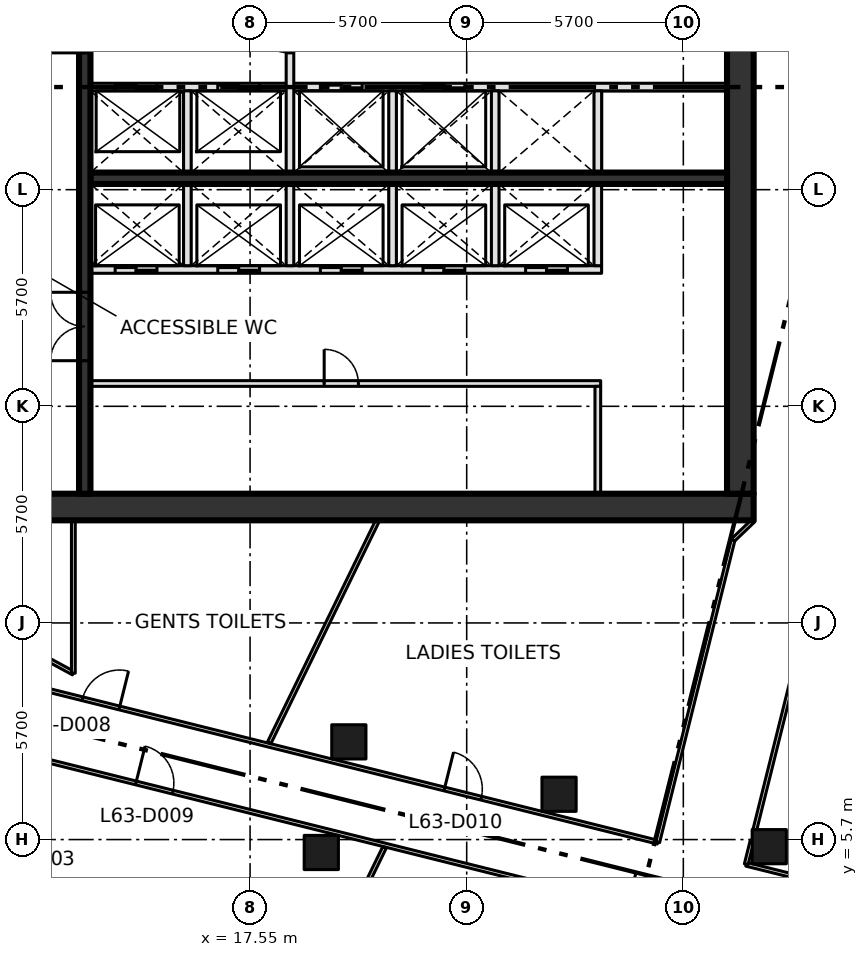
"""IFC4 building model, lengths in metres.
Left out: names, types, materials, properties, quantities, classifications, styles, units other than length and angle.
Written with IfcOpenShell. Run it as: python <this file> out.ifc"""

import sys

from ifc_helpers import new_model, si_unit, direction, frame, frame_2d, origin, origin_2d, place, context, subcontext, project, spatial, rectangle, extrude, element, fill, save


model = new_model("IFC4")
c1 = context("Model", 3, precision=1e-05, world=origin(), true_north=direction((0.0, 1.0)))
c2 = subcontext(c1, "Body", "Model", "MODEL_VIEW")
j1 = project(units=[si_unit("LENGTHUNIT", "METRE"), si_unit("PLANEANGLEUNIT", "RADIAN")], contexts=[c1])
p1 = place(None, origin())
s1 = spatial("IfcSite", under=j1, at=p1, CompositionType="ELEMENT")
p2 = place(p1, origin())
s2 = spatial("IfcBuilding", under=s1, at=p2, CompositionType="ELEMENT")
p3 = place(p2, frame((0.0, 0.0, 276.0)))
s3 = spatial("IfcBuildingStorey", under=s2, at=p3, CompositionType="ELEMENT", Elevation=276.0)
for number, where, z_axis, x_axis in (
    (1, (19.424, 5.36, 0.0), (0.0, 0.0, 1.0), (1.0, 0.0, 0.0)),
    (2, (20.149, 8.271, 0.0), (0.0, 0.0, 1.0), (1.0, 0.0, 0.0)),
    (3, (25.68, 6.892, 0.0), (0.0, 0.0, 1.0), (1.0, 0.0, 0.0)),
    (4, (31.211, 5.513, 0.0), (0.0, 0.0, 1.0), (1.0, 0.0, 0.0)),
):
    element("IfcColumn", number, at=place(p3, frame(where, z_axis=z_axis, x_axis=x_axis)), inside=s3, PredefinedType="COLUMN", context=c2, shape_type="SweptSolid", body=[
        extrude(rectangle(XDim=0.9, YDim=0.9, at=origin_2d()), origin(), (0.0, 0.0, 1.0), 4.2),
    ])
p4 = place(p3, frame((8.0, 14.45, -0.3), z_axis=(0.0, 0.0, 1.0), x_axis=(1.0, 0.0, 0.0)))
e5 = element("IfcWall", 5, at=p4, inside=s3, PredefinedType="SHEAR", context=c2, shape_type="SweptSolid", body=[
    extrude(rectangle(XDim=22.8, YDim=0.7, at=frame_2d((11.4, 0.0))), origin(), (0.0, 0.0, 1.0), 4.2),
])
p5 = place(p4, frame((2.3, 0.0, 0.3)))
e6 = element("IfcOpeningElement", 6, at=p5, cuts=e5, PredefinedType="OPENING", context=c2, shape_type="SweptSolid", body=[
    extrude(rectangle(XDim=1.8, YDim=2.1, at=frame_2d((0.9, 1.05))), frame((0.0, 0.36, 0.0), z_axis=(0.0, -1.0, 0.0), x_axis=(1.0, 0.0, 0.0)), (0.0, 0.0, 1.0), 0.72),
])
p6 = place(p3, frame((30.45, 14.8, -0.3), z_axis=(0.0, 0.0, 1.0), x_axis=(0.0, 1.0, 0.0)))
e7 = element("IfcWall", 7, at=p6, inside=s3, PredefinedType="SHEAR", context=c2, shape_type="SweptSolid", body=[
    extrude(rectangle(XDim=20.9, YDim=0.7, at=frame_2d((10.45, 0.0))), origin(), (0.0, 0.0, 1.0), 4.2),
])
p7 = place(p3, frame((13.35, 17.7, 0.0), z_axis=(0.0, 0.0, 1.0), x_axis=(1.0, 0.0, 0.0)))
e8 = element("IfcWall", 8, at=p7, inside=s3, PredefinedType="PARTITIONING", context=c2, shape_type="SweptSolid", body=[
    extrude(rectangle(XDim=13.425, YDim=0.15, at=frame_2d((6.712, 0.0))), origin(), (0.0, 0.0, 1.0), 3.9),
])
p8 = place(p7, frame((6.15, 0.0, 0.0)))
e9 = element("IfcOpeningElement", 9, at=p8, cuts=e8, PredefinedType="OPENING", context=c2, shape_type="SweptSolid", body=[
    extrude(rectangle(XDim=0.9, YDim=2.1, at=frame_2d((0.45, 1.05))), frame((0.0, 0.085, 0.0), z_axis=(0.0, -1.0, 0.0), x_axis=(1.0, 0.0, 0.0)), (0.0, 0.0, 1.0), 0.17),
])
p9 = place(p3, frame((13.35, 20.7, 0.0), z_axis=(0.0, 0.0, 1.0), x_axis=(1.0, 0.0, 0.0)))
e10 = element("IfcWall", 10, at=p9, inside=s3, PredefinedType="SOLIDWALL", context=c2, shape_type="SweptSolid", body=[
    extrude(rectangle(XDim=13.45, YDim=0.2, at=frame_2d((6.725, 0.0))), origin(), (0.0, 0.0, 1.0), 3.9),
])
p10 = place(p9, frame((0.65, 0.0, 0.0)))
e11 = element("IfcOpeningElement", 11, at=p10, cuts=e10, PredefinedType="OPENING", context=c2, shape_type="SweptSolid", body=[
    extrude(rectangle(XDim=1.1, YDim=2.1, at=frame_2d((0.55, 1.05))), frame((0.0, 0.11, 0.0), z_axis=(0.0, -1.0, 0.0), x_axis=(1.0, 0.0, 0.0)), (0.0, 0.0, 1.0), 0.22),
])
p11 = place(p9, frame((3.35, 0.0, 0.0)))
e12 = element("IfcOpeningElement", 12, at=p11, cuts=e10, PredefinedType="OPENING", context=c2, shape_type="SweptSolid", body=[
    extrude(rectangle(XDim=1.1, YDim=2.1, at=frame_2d((0.55, 1.05))), frame((0.0, 0.11, 0.0), z_axis=(0.0, -1.0, 0.0), x_axis=(1.0, 0.0, 0.0)), (0.0, 0.0, 1.0), 0.22),
])
p12 = place(p9, frame((6.05, 0.0, 0.0)))
e13 = element("IfcOpeningElement", 13, at=p12, cuts=e10, PredefinedType="OPENING", context=c2, shape_type="SweptSolid", body=[
    extrude(rectangle(XDim=1.1, YDim=2.1, at=frame_2d((0.55, 1.05))), frame((0.0, 0.11, 0.0), z_axis=(0.0, -1.0, 0.0), x_axis=(1.0, 0.0, 0.0)), (0.0, 0.0, 1.0), 0.22),
])
p13 = place(p9, frame((8.75, 0.0, 0.0)))
e14 = element("IfcOpeningElement", 14, at=p13, cuts=e10, PredefinedType="OPENING", context=c2, shape_type="SweptSolid", body=[
    extrude(rectangle(XDim=1.1, YDim=2.1, at=frame_2d((0.55, 1.05))), frame((0.0, 0.11, 0.0), z_axis=(0.0, -1.0, 0.0), x_axis=(1.0, 0.0, 0.0)), (0.0, 0.0, 1.0), 0.22),
])
p14 = place(p9, frame((11.45, 0.0, 0.0)))
e15 = element("IfcOpeningElement", 15, at=p14, cuts=e10, PredefinedType="OPENING", context=c2, shape_type="SweptSolid", body=[
    extrude(rectangle(XDim=1.1, YDim=2.1, at=frame_2d((0.55, 1.05))), frame((0.0, 0.11, 0.0), z_axis=(0.0, -1.0, 0.0), x_axis=(1.0, 0.0, 0.0)), (0.0, 0.0, 1.0), 0.22),
])
p15 = place(p3, frame((13.35, 23.1, 0.0), z_axis=(0.0, 0.0, 1.0), x_axis=(1.0, 0.0, 0.0)))
e16 = element("IfcWall", 16, at=p15, inside=s3, PredefinedType="SHEAR", context=c2, shape_type="SweptSolid", body=[
    extrude(rectangle(XDim=16.75, YDim=0.3, at=frame_2d((8.375, 0.0))), origin(), (0.0, 0.0, 1.0), 3.9),
])
p16 = place(p3, frame((13.35, 25.5, 0.0), z_axis=(0.0, 0.0, 1.0), x_axis=(1.0, 0.0, 0.0)))
e17 = element("IfcWall", 17, at=p16, inside=s3, PredefinedType="SOLIDWALL", context=c2, shape_type="SweptSolid", body=[
    extrude(rectangle(XDim=16.75, YDim=0.2, at=frame_2d((8.375, 0.0))), origin(), (0.0, 0.0, 1.0), 3.9),
])
p17 = place(p16, frame((0.65, 0.0, 0.0)))
e18 = element("IfcOpeningElement", 18, at=p17, cuts=e17, PredefinedType="OPENING", context=c2, shape_type="SweptSolid", body=[
    extrude(rectangle(XDim=1.1, YDim=2.1, at=frame_2d((0.55, 1.05))), frame((0.0, 0.11, 0.0), z_axis=(0.0, -1.0, 0.0), x_axis=(1.0, 0.0, 0.0)), (0.0, 0.0, 1.0), 0.22),
])
p18 = place(p16, frame((3.35, 0.0, 0.0)))
e19 = element("IfcOpeningElement", 19, at=p18, cuts=e17, PredefinedType="OPENING", context=c2, shape_type="SweptSolid", body=[
    extrude(rectangle(XDim=1.1, YDim=2.1, at=frame_2d((0.55, 1.05))), frame((0.0, 0.11, 0.0), z_axis=(0.0, -1.0, 0.0), x_axis=(1.0, 0.0, 0.0)), (0.0, 0.0, 1.0), 0.22),
])
p19 = place(p16, frame((6.05, 0.0, 0.0)))
e20 = element("IfcOpeningElement", 20, at=p19, cuts=e17, PredefinedType="OPENING", context=c2, shape_type="SweptSolid", body=[
    extrude(rectangle(XDim=1.1, YDim=2.1, at=frame_2d((0.55, 1.05))), frame((0.0, 0.11, 0.0), z_axis=(0.0, -1.0, 0.0), x_axis=(1.0, 0.0, 0.0)), (0.0, 0.0, 1.0), 0.22),
])
p20 = place(p16, frame((8.75, 0.0, 0.0)))
e21 = element("IfcOpeningElement", 21, at=p20, cuts=e17, PredefinedType="OPENING", context=c2, shape_type="SweptSolid", body=[
    extrude(rectangle(XDim=1.1, YDim=2.1, at=frame_2d((0.55, 1.05))), frame((0.0, 0.11, 0.0), z_axis=(0.0, -1.0, 0.0), x_axis=(1.0, 0.0, 0.0)), (0.0, 0.0, 1.0), 0.22),
])
p21 = place(p3, frame((13.2, 14.8, 0.0), z_axis=(0.0, 0.0, 1.0), x_axis=(0.0, 1.0, 0.0)))
e22 = element("IfcWall", 22, at=p21, inside=s3, PredefinedType="SHEAR", context=c2, shape_type="SweptSolid", body=[
    extrude(rectangle(XDim=20.9, YDim=0.3, at=frame_2d((10.45, 0.0))), origin(), (0.0, 0.0, 1.0), 3.9),
])
p22 = place(p21, frame((3.5, 0.0, 0.0)))
e23 = element("IfcOpeningElement", 23, at=p22, cuts=e22, PredefinedType="OPENING", context=c2, shape_type="SweptSolid", body=[
    extrude(rectangle(XDim=1.8, YDim=2.1, at=frame_2d((0.9, 1.05))), frame((0.0, 0.16, 0.0), z_axis=(0.0, -1.0, 0.0), x_axis=(1.0, 0.0, 0.0)), (0.0, 0.0, 1.0), 0.32),
])
p23 = place(p21, frame((11.6, 0.0, 0.0)))
e24 = element("IfcOpeningElement", 24, at=p23, cuts=e22, PredefinedType="OPENING", context=c2, shape_type="SweptSolid", body=[
    extrude(rectangle(XDim=1.2, YDim=2.1, at=frame_2d((0.6, 1.05))), frame((0.0, 0.16, 0.0), z_axis=(0.0, -1.0, 0.0), x_axis=(1.0, 0.0, 0.0)), (0.0, 0.0, 1.0), 0.32),
])
p24 = place(p3, frame((15.9, 20.8, 0.0), z_axis=(0.0, 0.0, 1.0), x_axis=(0.0, 1.0, 0.0)))
e25 = element("IfcWall", 25, at=p24, inside=s3, PredefinedType="SOLIDWALL", context=c2, shape_type="SweptSolid", body=[
    extrude(rectangle(XDim=4.6, YDim=0.2, at=frame_2d((2.3, 0.0))), origin(), (0.0, 0.0, 1.0), 3.9),
])
p25 = place(p3, frame((18.6, 20.8, 0.0), z_axis=(0.0, 0.0, 1.0), x_axis=(0.0, 1.0, 0.0)))
e26 = element("IfcWall", 26, at=p25, inside=s3, PredefinedType="SOLIDWALL", context=c2, shape_type="SweptSolid", body=[
    extrude(rectangle(XDim=7.6, YDim=0.2, at=frame_2d((3.8, 0.0))), origin(), (0.0, 0.0, 1.0), 3.9),
])
p26 = place(p25, frame((5.6, 0.0, 0.0)))
e27 = element("IfcOpeningElement", 27, at=p26, cuts=e26, PredefinedType="OPENING", context=c2, shape_type="SweptSolid", body=[
    extrude(rectangle(XDim=1.2, YDim=2.1, at=frame_2d((0.6, 1.05))), frame((0.0, 0.11, 0.0), z_axis=(0.0, -1.0, 0.0), x_axis=(1.0, 0.0, 0.0)), (0.0, 0.0, 1.0), 0.22),
])
for number, where, z_axis, x_axis in (
    (28, (21.3, 20.8, 0.0), (0.0, 0.0, 1.0), (0.0, 1.0, 0.0)),
    (29, (24.0, 20.8, 0.0), (0.0, 0.0, 1.0), (0.0, 1.0, 0.0)),
):
    element("IfcWall", number, at=place(p3, frame(where, z_axis=z_axis, x_axis=x_axis)), inside=s3, PredefinedType="SOLIDWALL", context=c2, shape_type="SweptSolid", body=[
        extrude(rectangle(XDim=4.6, YDim=0.2, at=frame_2d((2.3, 0.0))), origin(), (0.0, 0.0, 1.0), 3.9),
    ])
p27 = place(p3, frame((26.7, 14.8, 0.0), z_axis=(0.0, 0.0, 1.0), x_axis=(0.0, 1.0, 0.0)))
e30 = element("IfcWall", 30, at=p27, inside=s3, PredefinedType="PARTITIONING", context=c2, shape_type="SweptSolid", body=[
    extrude(rectangle(XDim=2.825, YDim=0.15, at=frame_2d((1.413, 0.0))), origin(), (0.0, 0.0, 1.0), 3.9),
])
p28 = place(p3, frame((26.7, 20.8, 0.0), z_axis=(0.0, 0.0, 1.0), x_axis=(0.0, 1.0, 0.0)))
e31 = element("IfcWall", 31, at=p28, inside=s3, PredefinedType="SOLIDWALL", context=c2, shape_type="SweptSolid", body=[
    extrude(rectangle(XDim=4.6, YDim=0.2, at=frame_2d((2.3, 0.0))), origin(), (0.0, 0.0, 1.0), 3.9),
])
p29 = place(p3, frame((10.263, 4.695, 0.0), z_axis=(0.0, 0.0, 1.0), x_axis=(0.615624224328, -0.788039855858, 0.0)))
e32 = element("IfcWall", 32, at=p29, inside=s3, PredefinedType="SOLIDWALL", context=c2, shape_type="SweptSolid", body=[
    extrude(rectangle(XDim=4.303, YDim=0.2, at=frame_2d((2.152, 0.0))), origin(), (0.0, 0.0, 1.0), 3.15),
])
p30 = place(p29, frame((1.251, 0.0, 0.0)))
e33 = element("IfcOpeningElement", 33, at=p30, cuts=e32, PredefinedType="OPENING", context=c2, shape_type="SweptSolid", body=[
    extrude(rectangle(XDim=1.8, YDim=2.9, at=frame_2d((0.9, 1.45))), frame((0.0, 0.11, 0.0), z_axis=(0.0, -1.0, 0.0), x_axis=(1.0, 0.0, 0.0)), (0.0, 0.0, 1.0), 0.22),
])
p31 = place(p3, frame((8.55, 8.685, 0.0), z_axis=(0.0, 0.0, 1.0), x_axis=(0.970297101369, -0.241916380335, 0.0)))
e34 = element("IfcWall", 34, at=p31, inside=s3, PredefinedType="PARTITIONING", context=c2, shape_type="SweptSolid", body=[
    extrude(rectangle(XDim=51.675, YDim=0.1, at=frame_2d((25.837, 0.0))), origin(), (0.0, 0.0, 1.0), 3.9),
])
p32 = place(p31, frame((35.018, 0.0, 0.0)))
e35 = element("IfcOpeningElement", 35, at=p32, cuts=e34, PredefinedType="OPENING", context=c2, shape_type="SweptSolid", body=[
    extrude(rectangle(XDim=1.8, YDim=2.1, at=frame_2d((0.9, 1.05))), frame((0.0, 0.06, 0.0), z_axis=(0.0, -1.0, 0.0), x_axis=(1.0, 0.0, 0.0)), (0.0, 0.0, 1.0), 0.12),
])
p33 = place(p31, frame((19.518, 0.0, 0.0)))
e36 = element("IfcOpeningElement", 36, at=p33, cuts=e34, PredefinedType="OPENING", context=c2, shape_type="SweptSolid", body=[
    extrude(rectangle(XDim=1.8, YDim=2.1, at=frame_2d((0.9, 1.05))), frame((0.0, 0.06, 0.0), z_axis=(0.0, -1.0, 0.0), x_axis=(1.0, 0.0, 0.0)), (0.0, 0.0, 1.0), 0.12),
])
p34 = place(p31, frame((25.118, 0.0, 0.0)))
e37 = element("IfcOpeningElement", 37, at=p34, cuts=e34, PredefinedType="OPENING", context=c2, shape_type="SweptSolid", body=[
    extrude(rectangle(XDim=1.0, YDim=2.1, at=frame_2d((0.5, 1.05))), frame((0.0, 0.06, 0.0), z_axis=(0.0, -1.0, 0.0), x_axis=(1.0, 0.0, 0.0)), (0.0, 0.0, 1.0), 0.12),
])
p35 = place(p31, frame((6.18, 0.0, 0.0)))
e38 = element("IfcOpeningElement", 38, at=p35, cuts=e34, PredefinedType="OPENING", context=c2, shape_type="SweptSolid", body=[
    extrude(rectangle(XDim=1.0, YDim=2.1, at=frame_2d((0.5, 1.05))), frame((0.0, 0.06, 0.0), z_axis=(0.0, -1.0, 0.0), x_axis=(1.0, 0.0, 0.0)), (0.0, 0.0, 1.0), 0.12),
])
p36 = place(p3, frame((8.988, 10.44, 0.0), z_axis=(0.0, 0.0, 1.0), x_axis=(0.970301223092, -0.241899848006, 0.0)))
e39 = element("IfcWall", 39, at=p36, inside=s3, PredefinedType="PARTITIONING", context=c2, shape_type="SweptSolid", body=[
    extrude(rectangle(XDim=19.879, YDim=0.1, at=frame_2d((9.94, 0.0))), origin(), (0.0, 0.0, 1.0), 3.9),
])
p37 = place(p36, frame((4.28, 0.0, 0.0)))
e40 = element("IfcOpeningElement", 40, at=p37, cuts=e39, PredefinedType="OPENING", context=c2, shape_type="SweptSolid", body=[
    extrude(rectangle(XDim=1.0, YDim=2.1, at=frame_2d((0.5, 1.05))), frame((0.0, 0.06, 0.0), z_axis=(0.0, -1.0, 0.0), x_axis=(1.0, 0.0, 0.0)), (0.0, 0.0, 1.0), 0.12),
])
p38 = place(p36, frame((14.093, 0.0, 0.0)))
e41 = element("IfcOpeningElement", 41, at=p38, cuts=e39, PredefinedType="OPENING", context=c2, shape_type="SweptSolid", body=[
    extrude(rectangle(XDim=1.0, YDim=2.1, at=frame_2d((0.5, 1.05))), frame((0.0, 0.06, 0.0), z_axis=(0.0, -1.0, 0.0), x_axis=(1.0, 0.0, 0.0)), (0.0, 0.0, 1.0), 0.12),
])
p39 = place(p3, frame((9.9, 11.7, 0.0), z_axis=(0.0, 0.0, 1.0), x_axis=(0.87965147249, -0.475618846291, 0.0)))
e42 = element("IfcWall", 42, at=p39, inside=s3, PredefinedType="PARTITIONING", context=c2, shape_type="SweptSolid", body=[
    extrude(rectangle(XDim=3.41, YDim=0.1, at=frame_2d((1.705, 0.0))), origin(), (0.0, 0.0, 1.0), 3.9),
])
p40 = place(p3, frame((12.9, 10.078, 0.0), z_axis=(0.0, 0.0, 1.0), x_axis=(0.0, 1.0, 0.0)))
e43 = element("IfcWall", 43, at=p40, inside=s3, PredefinedType="PARTITIONING", context=c2, shape_type="SweptSolid", body=[
    extrude(rectangle(XDim=4.022, YDim=0.1, at=frame_2d((2.011, 0.0))), origin(), (0.0, 0.0, 1.0), 3.9),
])
p41 = place(p3, frame((30.259, 13.583, 0.0), z_axis=(0.0, 0.0, 1.0), x_axis=(-0.241841612879, -0.970315739479, 0.0)))
e44 = element("IfcWall", 44, at=p41, inside=s3, PredefinedType="PARTITIONING", context=c2, shape_type="SweptSolid", body=[
    extrude(rectangle(XDim=8.195, YDim=0.1, at=frame_2d((4.098, 0.0))), origin(), (0.0, 0.0, 1.0), 3.9),
])
p42 = place(p3, frame((30.605, 5.05, 0.0), z_axis=(0.0, 0.0, 1.0), x_axis=(0.970299606839, -0.24190633098, 0.0)))
e45 = element("IfcWall", 45, at=p42, inside=s3, PredefinedType="PARTITIONING", context=c2, shape_type="SweptSolid", body=[
    extrude(rectangle(XDim=29.396, YDim=0.1, at=frame_2d((14.698, 0.0))), origin(), (0.0, 0.0, 1.0), 3.9),
])
p43 = place(p3, frame((30.605, 5.05, 0.0), z_axis=(0.0, 0.0, 1.0), x_axis=(0.241823201882, 0.970320328052, 0.0)))
e46 = element("IfcWall", 46, at=p43, inside=s3, PredefinedType="PARTITIONING", context=c2, shape_type="SweptSolid", body=[
    extrude(rectangle(XDim=0.645, YDim=0.1, at=frame_2d((0.323, 0.0))), origin(), (0.0, 0.0, 1.0), 3.9),
])
p44 = place(p3, frame((30.8, 14.1, 0.0), z_axis=(0.0, 0.0, 1.0), x_axis=(-0.722911025189, -0.690941133281, 0.0)))
e47 = element("IfcWall", 47, at=p44, inside=s3, PredefinedType="PARTITIONING", context=c2, shape_type="SweptSolid", body=[
    extrude(rectangle(XDim=0.748, YDim=0.1, at=frame_2d((0.374, 0.0))), origin(), (0.0, 0.0, 1.0), 3.9),
])
p45 = place(p3, frame((30.833, 5.963, 0.0), z_axis=(0.0, 0.0, 1.0), x_axis=(0.241902093757, 0.970300663215, 0.0)))
e48 = element("IfcWall", 48, at=p45, inside=s3, PredefinedType="PARTITIONING", context=c2, shape_type="SweptSolid", body=[
    extrude(rectangle(XDim=7.255, YDim=0.1, at=frame_2d((3.627, 0.0))), origin(), (0.0, 0.0, 1.0), 3.9),
])
p46 = place(p3, frame((16.853, -3.188, 0.0), z_axis=(0.0, 0.0, 1.0), x_axis=(0.43837932908, 0.898790055483, 0.0)))
e49 = element("IfcWall", 49, at=p46, inside=s3, PredefinedType="PARTITIONING", context=c2, shape_type="SweptSolid", body=[
    extrude(rectangle(XDim=9.663, YDim=0.1, at=frame_2d((4.832, 0.0))), origin(), (0.0, 0.0, 1.0), 3.9),
])
p47 = place(p3, frame((18.051, 8.242, 0.0), z_axis=(0.0, 0.0, 1.0), x_axis=(0.438336545362, 0.898810921719, 0.0)))
e50 = element("IfcWall", 50, at=p47, inside=s3, PredefinedType="PARTITIONING", context=c2, shape_type="SweptSolid", body=[
    extrude(rectangle(XDim=6.518, YDim=0.1, at=frame_2d((3.259, 0.0))), origin(), (0.0, 0.0, 1.0), 3.9),
])
p48 = place(p10, origin())
e51 = element("IfcDoor", 51, at=p48, inside=s3, OperationType="SLIDING_TO_LEFT", PredefinedType="DOOR", context=c2, shape_type="SweptSolid", body=[
    extrude(rectangle(XDim=1.1, YDim=2.1, at=frame_2d((0.55, 1.05))), frame((0.0, 0.025, 0.0), z_axis=(0.0, -1.0, 0.0), x_axis=(1.0, 0.0, 0.0)), (0.0, 0.0, 1.0), 0.05),
])
fill(e11, e51)
p49 = place(p11, origin())
e52 = element("IfcDoor", 52, at=p49, inside=s3, OperationType="SLIDING_TO_LEFT", PredefinedType="DOOR", context=c2, shape_type="SweptSolid", body=[
    extrude(rectangle(XDim=1.1, YDim=2.1, at=frame_2d((0.55, 1.05))), frame((0.0, 0.025, 0.0), z_axis=(0.0, -1.0, 0.0), x_axis=(1.0, 0.0, 0.0)), (0.0, 0.0, 1.0), 0.05),
])
fill(e12, e52)
p50 = place(p12, origin())
e53 = element("IfcDoor", 53, at=p50, inside=s3, OperationType="SLIDING_TO_LEFT", PredefinedType="DOOR", context=c2, shape_type="SweptSolid", body=[
    extrude(rectangle(XDim=1.1, YDim=2.1, at=frame_2d((0.55, 1.05))), frame((0.0, 0.025, 0.0), z_axis=(0.0, -1.0, 0.0), x_axis=(1.0, 0.0, 0.0)), (0.0, 0.0, 1.0), 0.05),
])
fill(e13, e53)
p51 = place(p13, origin())
e54 = element("IfcDoor", 54, at=p51, inside=s3, OperationType="SLIDING_TO_LEFT", PredefinedType="DOOR", context=c2, shape_type="SweptSolid", body=[
    extrude(rectangle(XDim=1.1, YDim=2.1, at=frame_2d((0.55, 1.05))), frame((0.0, 0.025, 0.0), z_axis=(0.0, -1.0, 0.0), x_axis=(1.0, 0.0, 0.0)), (0.0, 0.0, 1.0), 0.05),
])
fill(e14, e54)
p52 = place(p14, origin())
e55 = element("IfcDoor", 55, at=p52, inside=s3, OperationType="SLIDING_TO_LEFT", PredefinedType="DOOR", context=c2, shape_type="SweptSolid", body=[
    extrude(rectangle(XDim=1.1, YDim=2.1, at=frame_2d((0.55, 1.05))), frame((0.0, 0.025, 0.0), z_axis=(0.0, -1.0, 0.0), x_axis=(1.0, 0.0, 0.0)), (0.0, 0.0, 1.0), 0.05),
])
fill(e15, e55)
p53 = place(p17, origin())
e56 = element("IfcDoor", 56, at=p53, inside=s3, OperationType="SLIDING_TO_LEFT", PredefinedType="DOOR", context=c2, shape_type="SweptSolid", body=[
    extrude(rectangle(XDim=1.1, YDim=2.1, at=frame_2d((0.55, 1.05))), frame((0.0, 0.025, 0.0), z_axis=(0.0, -1.0, 0.0), x_axis=(1.0, 0.0, 0.0)), (0.0, 0.0, 1.0), 0.05),
])
fill(e18, e56)
p54 = place(p18, origin())
e57 = element("IfcDoor", 57, at=p54, inside=s3, OperationType="SLIDING_TO_LEFT", PredefinedType="DOOR", context=c2, shape_type="SweptSolid", body=[
    extrude(rectangle(XDim=1.1, YDim=2.1, at=frame_2d((0.55, 1.05))), frame((0.0, 0.025, 0.0), z_axis=(0.0, -1.0, 0.0), x_axis=(1.0, 0.0, 0.0)), (0.0, 0.0, 1.0), 0.05),
])
fill(e19, e57)
p55 = place(p19, origin())
e58 = element("IfcDoor", 58, at=p55, inside=s3, OperationType="SLIDING_TO_LEFT", PredefinedType="DOOR", context=c2, shape_type="SweptSolid", body=[
    extrude(rectangle(XDim=1.1, YDim=2.1, at=frame_2d((0.55, 1.05))), frame((0.0, 0.025, 0.0), z_axis=(0.0, -1.0, 0.0), x_axis=(1.0, 0.0, 0.0)), (0.0, 0.0, 1.0), 0.05),
])
fill(e20, e58)
p56 = place(p20, origin())
e59 = element("IfcDoor", 59, at=p56, inside=s3, OperationType="SLIDING_TO_LEFT", PredefinedType="DOOR", context=c2, shape_type="SweptSolid", body=[
    extrude(rectangle(XDim=1.1, YDim=2.1, at=frame_2d((0.55, 1.05))), frame((0.0, 0.025, 0.0), z_axis=(0.0, -1.0, 0.0), x_axis=(1.0, 0.0, 0.0)), (0.0, 0.0, 1.0), 0.05),
])
fill(e21, e59)
p57 = place(p8, origin())
e60 = element("IfcDoor", 60, at=p57, inside=s3, OperationType="SINGLE_SWING_LEFT", PredefinedType="DOOR", context=c2, shape_type="SweptSolid", body=[
    extrude(rectangle(XDim=0.9, YDim=2.1, at=frame_2d((0.45, 1.05))), frame((0.0, 0.025, 0.0), z_axis=(0.0, -1.0, 0.0), x_axis=(1.0, 0.0, 0.0)), (0.0, 0.0, 1.0), 0.05),
])
fill(e9, e60)
p58 = place(p22, origin())
e61 = element("IfcDoor", 61, at=p58, inside=s3, OperationType="DOUBLE_DOOR_SINGLE_SWING", PredefinedType="DOOR", context=c2, shape_type="SweptSolid", body=[
    extrude(rectangle(XDim=1.8, YDim=2.1, at=frame_2d((0.9, 1.05))), frame((0.0, 0.025, 0.0), z_axis=(0.0, -1.0, 0.0), x_axis=(1.0, 0.0, 0.0)), (0.0, 0.0, 1.0), 0.05),
])
fill(e23, e61)
p59 = place(p37, origin())
e62 = element("IfcDoor", 62, at=p59, inside=s3, OperationType="SINGLE_SWING_RIGHT", PredefinedType="DOOR", context=c2, shape_type="SweptSolid", body=[
    extrude(rectangle(XDim=1.0, YDim=2.1, at=frame_2d((0.5, 1.05))), frame((0.0, 0.025, 0.0), z_axis=(0.0, -1.0, 0.0), x_axis=(1.0, 0.0, 0.0)), (0.0, 0.0, 1.0), 0.05),
])
fill(e40, e62)
p60 = place(p35, origin())
e63 = element("IfcDoor", 63, at=p60, inside=s3, OperationType="SINGLE_SWING_LEFT", PredefinedType="DOOR", context=c2, shape_type="SweptSolid", body=[
    extrude(rectangle(XDim=1.0, YDim=2.1, at=frame_2d((0.5, 1.05))), frame((0.0, 0.025, 0.0), z_axis=(0.0, -1.0, 0.0), x_axis=(1.0, 0.0, 0.0)), (0.0, 0.0, 1.0), 0.05),
])
fill(e38, e63)
p61 = place(p38, origin())
e64 = element("IfcDoor", 64, at=p61, inside=s3, OperationType="SINGLE_SWING_LEFT", PredefinedType="DOOR", context=c2, shape_type="SweptSolid", body=[
    extrude(rectangle(XDim=1.0, YDim=2.1, at=frame_2d((0.5, 1.05))), frame((0.0, 0.025, 0.0), z_axis=(0.0, -1.0, 0.0), x_axis=(1.0, 0.0, 0.0)), (0.0, 0.0, 1.0), 0.05),
])
fill(e41, e64)
save(model, sys.argv[1])
